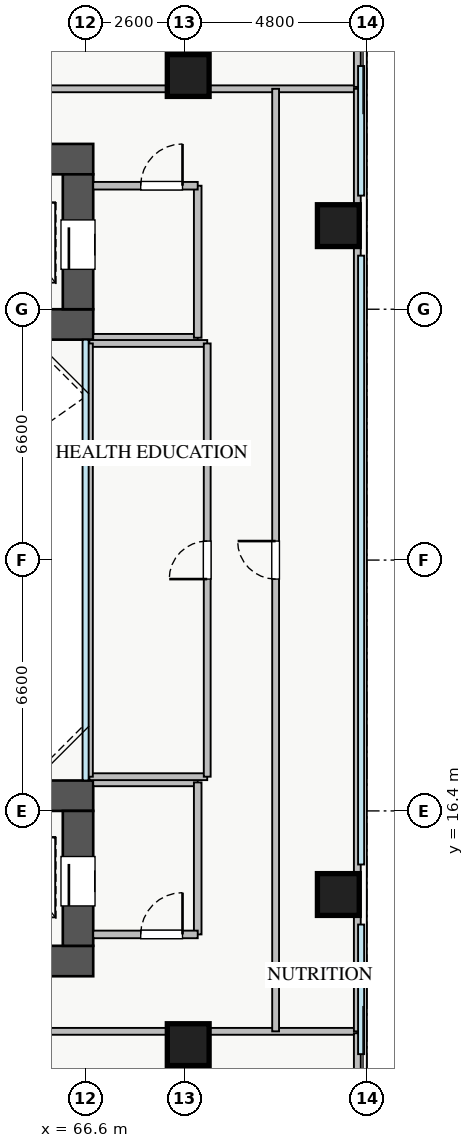
"""IFC4 building model, lengths in metres.
Left out: names, types, materials, properties, quantities, classifications, styles, units other than length and angle.
Written with IfcOpenShell. Run it as: python <this file> out.ifc"""

import sys

from ifc_helpers import new_model, si_unit, direction, frame, frame_2d, origin, origin_2d, place, context, subcontext, project, spatial, rectangle, extrude, source, transform, mapped, element, fill, save


model = new_model("IFC4")
c1 = context("Model", 3, precision=1e-05, world=origin(), true_north=direction((0.0, 1.0)))
c2 = subcontext(c1, "Body", "Model", "MODEL_VIEW")
j1 = project(units=[si_unit("LENGTHUNIT", "METRE"), si_unit("PLANEANGLEUNIT", "RADIAN")], contexts=[c1])
p1 = place(None, origin())
s1 = spatial("IfcSite", under=j1, at=p1, CompositionType="ELEMENT")
p2 = place(p1, origin())
s2 = spatial("IfcBuilding", under=s1, at=p2, CompositionType="ELEMENT")
p3 = place(p2, frame((0.0, 0.0, 13.8)))
s3 = spatial("IfcBuildingStorey", under=s2, at=p3, CompositionType="ELEMENT", Elevation=13.8)
p4 = place(p3, frame((54.2, 29.2, 0.0), z_axis=(0.0, 0.0, 1.0), x_axis=(1.0, 0.0, 0.0)))
e1 = element("IfcWall", 1, at=p4, inside=s3, PredefinedType="SHEAR", context=c2, shape_type="SweptSolid", body=[
    extrude(rectangle(XDim=12.6, YDim=0.8, at=frame_2d((6.3, 0.0))), origin(), (0.0, 0.0, 1.0), 4.4),
])
p5 = place(p3, frame((54.2, 33.55, 0.0), z_axis=(0.0, 0.0, 1.0), x_axis=(1.0, 0.0, 0.0)))
e2 = element("IfcWall", 2, at=p5, inside=s3, PredefinedType="SHEAR", context=c2, shape_type="SweptSolid", body=[
    extrude(rectangle(XDim=12.6, YDim=0.8, at=frame_2d((6.3, 0.0))), origin(), (0.0, 0.0, 1.0), 4.4),
])
p6 = place(p5, frame((8.2, 0.0, 0.0)))
e3 = element("IfcOpeningElement", 3, at=p6, cuts=e2, PredefinedType="OPENING", context=c2, shape_type="SweptSolid", body=[
    extrude(rectangle(XDim=1.1, YDim=2.05, at=frame_2d((0.55, 1.025))), frame((0.0, 0.41, 0.0), z_axis=(0.0, -1.0, 0.0), x_axis=(1.0, 0.0, 0.0)), (0.0, 0.0, 1.0), 0.82),
])
p7 = place(p3, frame((66.4, 29.6, 0.0), z_axis=(0.0, 0.0, 1.0), x_axis=(0.0, 1.0, 0.0)))
e4 = element("IfcWall", 4, at=p7, inside=s3, PredefinedType="SHEAR", context=c2, shape_type="SweptSolid", body=[
    extrude(rectangle(XDim=3.55, YDim=0.8, at=frame_2d((1.775, 0.0))), origin(), (0.0, 0.0, 1.0), 4.4),
])
p8 = place(p7, frame((1.05, 0.0, 0.0)))
e5 = element("IfcOpeningElement", 5, at=p8, cuts=e4, PredefinedType="OPENING", context=c2, shape_type="SweptSolid", body=[
    extrude(rectangle(XDim=1.3, YDim=2.05, at=frame_2d((0.65, 1.025))), frame((0.0, 0.41, 0.0), z_axis=(0.0, -1.0, 0.0), x_axis=(1.0, 0.0, 0.0)), (0.0, 0.0, 1.0), 0.82),
])
p9 = place(p3, frame((54.2, 12.45, 0.0), z_axis=(0.0, 0.0, 1.0), x_axis=(1.0, 0.0, 0.0)))
e6 = element("IfcWall", 6, at=p9, inside=s3, PredefinedType="SHEAR", context=c2, shape_type="SweptSolid", body=[
    extrude(rectangle(XDim=12.6, YDim=0.8, at=frame_2d((6.3, 0.0))), origin(), (0.0, 0.0, 1.0), 4.4),
])
p10 = place(p9, frame((8.2, 0.0, 0.0)))
e7 = element("IfcOpeningElement", 7, at=p10, cuts=e6, PredefinedType="OPENING", context=c2, shape_type="SweptSolid", body=[
    extrude(rectangle(XDim=1.1, YDim=2.05, at=frame_2d((0.55, 1.025))), frame((0.0, 0.41, 0.0), z_axis=(0.0, -1.0, 0.0), x_axis=(1.0, 0.0, 0.0)), (0.0, 0.0, 1.0), 0.82),
])
p11 = place(p3, frame((54.2, 16.8, 0.0), z_axis=(0.0, 0.0, 1.0), x_axis=(1.0, 0.0, 0.0)))
e8 = element("IfcWall", 8, at=p11, inside=s3, PredefinedType="SHEAR", context=c2, shape_type="SweptSolid", body=[
    extrude(rectangle(XDim=12.6, YDim=0.8, at=frame_2d((6.3, 0.0))), origin(), (0.0, 0.0, 1.0), 4.4),
])
p12 = place(p3, frame((66.4, 12.85, 0.0), z_axis=(0.0, 0.0, 1.0), x_axis=(0.0, 1.0, 0.0)))
e9 = element("IfcWall", 9, at=p12, inside=s3, PredefinedType="SHEAR", context=c2, shape_type="SweptSolid", body=[
    extrude(rectangle(XDim=3.55, YDim=0.8, at=frame_2d((1.775, 0.0))), origin(), (0.0, 0.0, 1.0), 4.4),
])
p13 = place(p12, frame((1.05, 0.0, 0.0)))
e10 = element("IfcOpeningElement", 10, at=p13, cuts=e9, PredefinedType="OPENING", context=c2, shape_type="SweptSolid", body=[
    extrude(rectangle(XDim=1.3, YDim=2.05, at=frame_2d((0.65, 1.025))), frame((0.0, 0.41, 0.0), z_axis=(0.0, -1.0, 0.0), x_axis=(1.0, 0.0, 0.0)), (0.0, 0.0, 1.0), 0.82),
])
m1 = source(origin(), c2, "Body", "SweptSolid", [
    extrude(rectangle(XDim=1.1, YDim=1.1, at=origin_2d()), origin(), (0.0, 0.0, 1.0), 4.4),
])
for number, where, z_axis, x_axis in (
    (11, (69.3, 10.25, 0.0), (0.0, 0.0, 1.0), (1.0, 0.0, 0.0)),
    (12, (73.25, 14.2, 0.0), (0.0, 0.0, 1.0), (1.0, 0.0, 0.0)),
    (13, (73.25, 31.8, 0.0), (0.0, 0.0, 1.0), (1.0, 0.0, 0.0)),
    (14, (69.3, 35.75, 0.0), (0.0, 0.0, 1.0), (1.0, 0.0, 0.0)),
):
    element("IfcColumn", number, at=place(p3, frame(where, z_axis=z_axis, x_axis=x_axis)), inside=s3, PredefinedType="COLUMN", context=c2, shape_type="MappedRepresentation", body=[
        mapped(m1, transform((0.0, 0.0, 0.0), x_axis=(1.0, 0.0, 0.0), y_axis=(0.0, 1.0, 0.0), z_axis=(0.0, 0.0, 1.0), scale=1.0)),
    ])
p14 = place(p3, frame((66.8, 28.85, 0.0), z_axis=(0.0, 0.0, 1.0), x_axis=(1.0, 0.0, 0.0)))
e15 = element("IfcWall", 15, at=p14, inside=s3, PredefinedType="PARTITIONING", context=c2, shape_type="SweptSolid", body=[
    extrude(rectangle(XDim=2.75, YDim=0.2, at=frame_2d((1.375, 0.0))), origin(), (0.0, 0.0, 1.0), 4.15),
])
p15 = place(p3, frame((69.55, 28.85, 0.0), z_axis=(0.0, 0.0, 1.0), x_axis=(0.0, 1.0, 0.0)))
e16 = element("IfcWall", 16, at=p15, inside=s3, PredefinedType="PARTITIONING", context=c2, shape_type="SweptSolid", body=[
    extrude(rectangle(XDim=4.0, YDim=0.2, at=frame_2d((2.0, 0.0))), origin(), (0.0, 0.0, 1.0), 4.15),
])
p16 = place(p3, frame((66.8, 32.85, 0.0), z_axis=(0.0, 0.0, 1.0), x_axis=(1.0, 0.0, 0.0)))
e17 = element("IfcWall", 17, at=p16, inside=s3, PredefinedType="PARTITIONING", context=c2, shape_type="SweptSolid", body=[
    extrude(rectangle(XDim=2.75, YDim=0.2, at=frame_2d((1.375, 0.0))), origin(), (0.0, 0.0, 1.0), 4.15),
])
p17 = place(p16, frame((1.25, 0.0, 0.0)))
e18 = element("IfcOpeningElement", 18, at=p17, cuts=e17, PredefinedType="OPENING", context=c2, shape_type="SweptSolid", body=[
    extrude(rectangle(XDim=1.1, YDim=2.05, at=frame_2d((0.55, 1.025))), frame((0.0, 0.11, 0.0), z_axis=(0.0, -1.0, 0.0), x_axis=(1.0, 0.0, 0.0)), (0.0, 0.0, 1.0), 0.22),
])
p18 = place(p3, frame((66.8, 17.15, 0.0), z_axis=(0.0, 0.0, 1.0), x_axis=(1.0, 0.0, 0.0)))
e19 = element("IfcWall", 19, at=p18, inside=s3, PredefinedType="PARTITIONING", context=c2, shape_type="SweptSolid", body=[
    extrude(rectangle(XDim=2.75, YDim=0.2, at=frame_2d((1.375, 0.0))), origin(), (0.0, 0.0, 1.0), 4.15),
])
p19 = place(p3, frame((69.55, 13.15, 0.0), z_axis=(0.0, 0.0, 1.0), x_axis=(0.0, 1.0, 0.0)))
e20 = element("IfcWall", 20, at=p19, inside=s3, PredefinedType="PARTITIONING", context=c2, shape_type="SweptSolid", body=[
    extrude(rectangle(XDim=4.0, YDim=0.2, at=frame_2d((2.0, 0.0))), origin(), (0.0, 0.0, 1.0), 4.15),
])
p20 = place(p3, frame((66.8, 13.15, 0.0), z_axis=(0.0, 0.0, 1.0), x_axis=(1.0, 0.0, 0.0)))
e21 = element("IfcWall", 21, at=p20, inside=s3, PredefinedType="PARTITIONING", context=c2, shape_type="SweptSolid", body=[
    extrude(rectangle(XDim=2.75, YDim=0.2, at=frame_2d((1.375, 0.0))), origin(), (0.0, 0.0, 1.0), 4.15),
])
p21 = place(p20, frame((1.25, 0.0, 0.0)))
e22 = element("IfcOpeningElement", 22, at=p21, cuts=e21, PredefinedType="OPENING", context=c2, shape_type="SweptSolid", body=[
    extrude(rectangle(XDim=1.1, YDim=2.05, at=frame_2d((0.55, 1.025))), frame((0.0, 0.11, 0.0), z_axis=(0.0, -1.0, 0.0), x_axis=(1.0, 0.0, 0.0)), (0.0, 0.0, 1.0), 0.22),
])
for number, where, z_axis, x_axis in (
    (23, (66.7, 17.3, 0.0), (0.0, 0.0, 1.0), (1.0, 0.0, 0.0)),
    (24, (66.7, 28.7, 0.0), (0.0, 0.0, 1.0), (1.0, 0.0, 0.0)),
):
    element("IfcWall", number, at=place(p3, frame(where, z_axis=z_axis, x_axis=x_axis)), inside=s3, PredefinedType="PARTITIONING", context=c2, shape_type="SweptSolid", body=[
        extrude(rectangle(XDim=3.1, YDim=0.18, at=frame_2d((1.55, 0.0))), origin(), (0.0, 0.0, 1.0), 4.15),
    ])
p22 = place(p3, frame((66.7, 17.3, 0.0), z_axis=(0.0, 0.0, 1.0), x_axis=(0.0, 1.0, 0.0)))
e25 = element("IfcWall", 25, at=p22, inside=s3, PredefinedType="PARTITIONING", context=c2, shape_type="SweptSolid", body=[
    extrude(rectangle(XDim=11.4, YDim=0.18, at=frame_2d((5.7, 0.0))), origin(), (0.0, 0.0, 1.0), 4.15),
])
p23 = place(p3, frame((69.8, 17.3, 0.0), z_axis=(0.0, 0.0, 1.0), x_axis=(0.0, 1.0, 0.0)))
e26 = element("IfcWall", 26, at=p23, inside=s3, PredefinedType="PARTITIONING", context=c2, shape_type="SweptSolid", body=[
    extrude(rectangle(XDim=11.4, YDim=0.18, at=frame_2d((5.7, 0.0))), origin(), (0.0, 0.0, 1.0), 4.15),
])
p24 = place(p23, frame((5.2, 0.0, 0.0)))
e27 = element("IfcOpeningElement", 27, at=p24, cuts=e26, PredefinedType="OPENING", context=c2, shape_type="SweptSolid", body=[
    extrude(rectangle(XDim=1.0, YDim=2.05, at=frame_2d((0.5, 1.025))), frame((0.0, 0.1, 0.0), z_axis=(0.0, -1.0, 0.0), x_axis=(1.0, 0.0, 0.0)), (0.0, 0.0, 1.0), 0.2),
])
p25 = place(p3, frame((54.2, 10.6, 0.0), z_axis=(0.0, 0.0, 1.0), x_axis=(1.0, 0.0, 0.0)))
e28 = element("IfcWall", 28, at=p25, inside=s3, PredefinedType="PARTITIONING", context=c2, shape_type="SweptSolid", body=[
    extrude(rectangle(XDim=19.55, YDim=0.18, at=frame_2d((9.775, 0.0))), origin(), (0.0, 0.0, 1.0), 4.15),
])
p26 = place(p25, frame((9.275, 0.0, 0.0)))
e29 = element("IfcOpeningElement", 29, at=p26, cuts=e28, PredefinedType="OPENING", context=c2, shape_type="SweptSolid", body=[
    extrude(rectangle(XDim=1.0, YDim=2.05, at=frame_2d((0.5, 1.025))), frame((0.0, 0.1, 0.0), z_axis=(0.0, -1.0, 0.0), x_axis=(1.0, 0.0, 0.0)), (0.0, 0.0, 1.0), 0.2),
])
p27 = place(p3, frame((54.2, 35.4, 0.0), z_axis=(0.0, 0.0, 1.0), x_axis=(1.0, 0.0, 0.0)))
e30 = element("IfcWall", 30, at=p27, inside=s3, PredefinedType="PARTITIONING", context=c2, shape_type="SweptSolid", body=[
    extrude(rectangle(XDim=19.55, YDim=0.18, at=frame_2d((9.775, 0.0))), origin(), (0.0, 0.0, 1.0), 4.15),
])
p28 = place(p27, frame((9.275, 0.0, 0.0)))
e31 = element("IfcOpeningElement", 31, at=p28, cuts=e30, PredefinedType="OPENING", context=c2, shape_type="SweptSolid", body=[
    extrude(rectangle(XDim=1.0, YDim=2.05, at=frame_2d((0.5, 1.025))), frame((0.0, 0.1, 0.0), z_axis=(0.0, -1.0, 0.0), x_axis=(1.0, 0.0, 0.0)), (0.0, 0.0, 1.0), 0.2),
])
p29 = place(p3, frame((71.6, 10.6, 0.0), z_axis=(0.0, 0.0, 1.0), x_axis=(0.0, 1.0, 0.0)))
e32 = element("IfcWall", 32, at=p29, inside=s3, PredefinedType="PARTITIONING", context=c2, shape_type="SweptSolid", body=[
    extrude(rectangle(XDim=24.8, YDim=0.18, at=frame_2d((12.4, 0.0))), origin(), (0.0, 0.0, 1.0), 4.15),
])
p30 = place(p29, frame((11.9, 0.0, 0.0)))
e33 = element("IfcOpeningElement", 33, at=p30, cuts=e32, PredefinedType="OPENING", context=c2, shape_type="SweptSolid", body=[
    extrude(rectangle(XDim=1.0, YDim=2.05, at=frame_2d((0.5, 1.025))), frame((0.0, 0.1, 0.0), z_axis=(0.0, -1.0, 0.0), x_axis=(1.0, 0.0, 0.0)), (0.0, 0.0, 1.0), 0.2),
])
p31 = place(p3, frame((73.75, 10.6, 0.0), z_axis=(0.0, 0.0, 1.0), x_axis=(0.0, 1.0, 0.0)))
e34 = element("IfcWall", 34, at=p31, inside=s3, PredefinedType="PARTITIONING", context=c2, shape_type="SweptSolid", body=[
    extrude(rectangle(XDim=24.8, YDim=0.18, at=frame_2d((12.4, 0.0))), origin(), (0.0, 0.0, 1.0), 4.15),
])
for number, where, z_axis, x_axis in (
    (35, (73.75, 5.75, 0.0), (0.0, 0.0, 1.0), (0.0, 1.0, 0.0)),
    (36, (73.75, 35.45, 0.0), (0.0, 0.0, 1.0), (0.0, 1.0, 0.0)),
):
    element("IfcWall", number, at=place(p3, frame(where, z_axis=z_axis, x_axis=x_axis)), inside=s3, PredefinedType="PARTITIONING", context=c2, shape_type="SweptSolid", body=[
        extrude(rectangle(XDim=4.8, YDim=0.18, at=frame_2d((2.4, 0.0))), origin(), (0.0, 0.0, 1.0), 4.15),
    ])
m2 = source(origin(), c2, "Body", "SweptSolid", [
    extrude(rectangle(XDim=1.3, YDim=2.05, at=frame_2d((0.65, 1.025))), frame((0.0, 0.025, 0.0), z_axis=(0.0, -1.0, 0.0), x_axis=(1.0, 0.0, 0.0)), (0.0, 0.0, 1.0), 0.05),
])
p32 = place(p8, origin())
e37 = element("IfcDoor", 37, at=p32, inside=s3, OperationType="SLIDING_TO_LEFT", PredefinedType="DOOR", context=c2, shape_type="MappedRepresentation", body=[
    mapped(m2, transform((0.0, 0.0, 0.0), x_axis=(1.0, 0.0, 0.0), y_axis=(0.0, 1.0, 0.0), z_axis=(0.0, 0.0, 1.0), scale=1.0)),
])
fill(e5, e37)
p33 = place(p13, origin())
e38 = element("IfcDoor", 38, at=p33, inside=s3, OperationType="SLIDING_TO_RIGHT", PredefinedType="DOOR", context=c2, shape_type="MappedRepresentation", body=[
    mapped(m2, transform((0.0, 0.0, 0.0), x_axis=(1.0, 0.0, 0.0), y_axis=(0.0, 1.0, 0.0), z_axis=(0.0, 0.0, 1.0), scale=1.0)),
])
fill(e10, e38)
m3 = source(origin(), c2, "Body", "SweptSolid", [
    extrude(rectangle(XDim=1.1, YDim=2.05, at=frame_2d((0.55, 1.025))), frame((0.0, 0.025, 0.0), z_axis=(0.0, -1.0, 0.0), x_axis=(1.0, 0.0, 0.0)), (0.0, 0.0, 1.0), 0.05),
])
p34 = place(p17, origin())
e39 = element("IfcDoor", 39, at=p34, inside=s3, OperationType="SINGLE_SWING_RIGHT", PredefinedType="DOOR", context=c2, shape_type="MappedRepresentation", body=[
    mapped(m3, transform((0.0, 0.0, 0.0), x_axis=(1.0, 0.0, 0.0), y_axis=(0.0, 1.0, 0.0), z_axis=(0.0, 0.0, 1.0), scale=1.0)),
])
fill(e18, e39)
p35 = place(p21, origin())
e40 = element("IfcDoor", 40, at=p35, inside=s3, OperationType="SINGLE_SWING_RIGHT", PredefinedType="DOOR", context=c2, shape_type="MappedRepresentation", body=[
    mapped(m3, transform((0.0, 0.0, 0.0), x_axis=(1.0, 0.0, 0.0), y_axis=(0.0, 1.0, 0.0), z_axis=(0.0, 0.0, 1.0), scale=1.0)),
])
fill(e22, e40)
m4 = source(origin(), c2, "Body", "SweptSolid", [
    extrude(rectangle(XDim=1.0, YDim=2.05, at=frame_2d((0.5, 1.025))), frame((0.0, 0.025, 0.0), z_axis=(0.0, -1.0, 0.0), x_axis=(1.0, 0.0, 0.0)), (0.0, 0.0, 1.0), 0.05),
])
p36 = place(p24, origin())
e41 = element("IfcDoor", 41, at=p36, inside=s3, OperationType="SINGLE_SWING_LEFT", PredefinedType="DOOR", context=c2, shape_type="MappedRepresentation", body=[
    mapped(m4, transform((0.0, 0.0, 0.0), x_axis=(1.0, 0.0, 0.0), y_axis=(0.0, 1.0, 0.0), z_axis=(0.0, 0.0, 1.0), scale=1.0)),
])
fill(e27, e41)
p37 = place(p30, origin())
e42 = element("IfcDoor", 42, at=p37, inside=s3, OperationType="SINGLE_SWING_RIGHT", PredefinedType="DOOR", context=c2, shape_type="MappedRepresentation", body=[
    mapped(m4, transform((0.0, 0.0, 0.0), x_axis=(1.0, 0.0, 0.0), y_axis=(0.0, 1.0, 0.0), z_axis=(0.0, 0.0, 1.0), scale=1.0)),
])
fill(e33, e42)
save(model, sys.argv[1])
